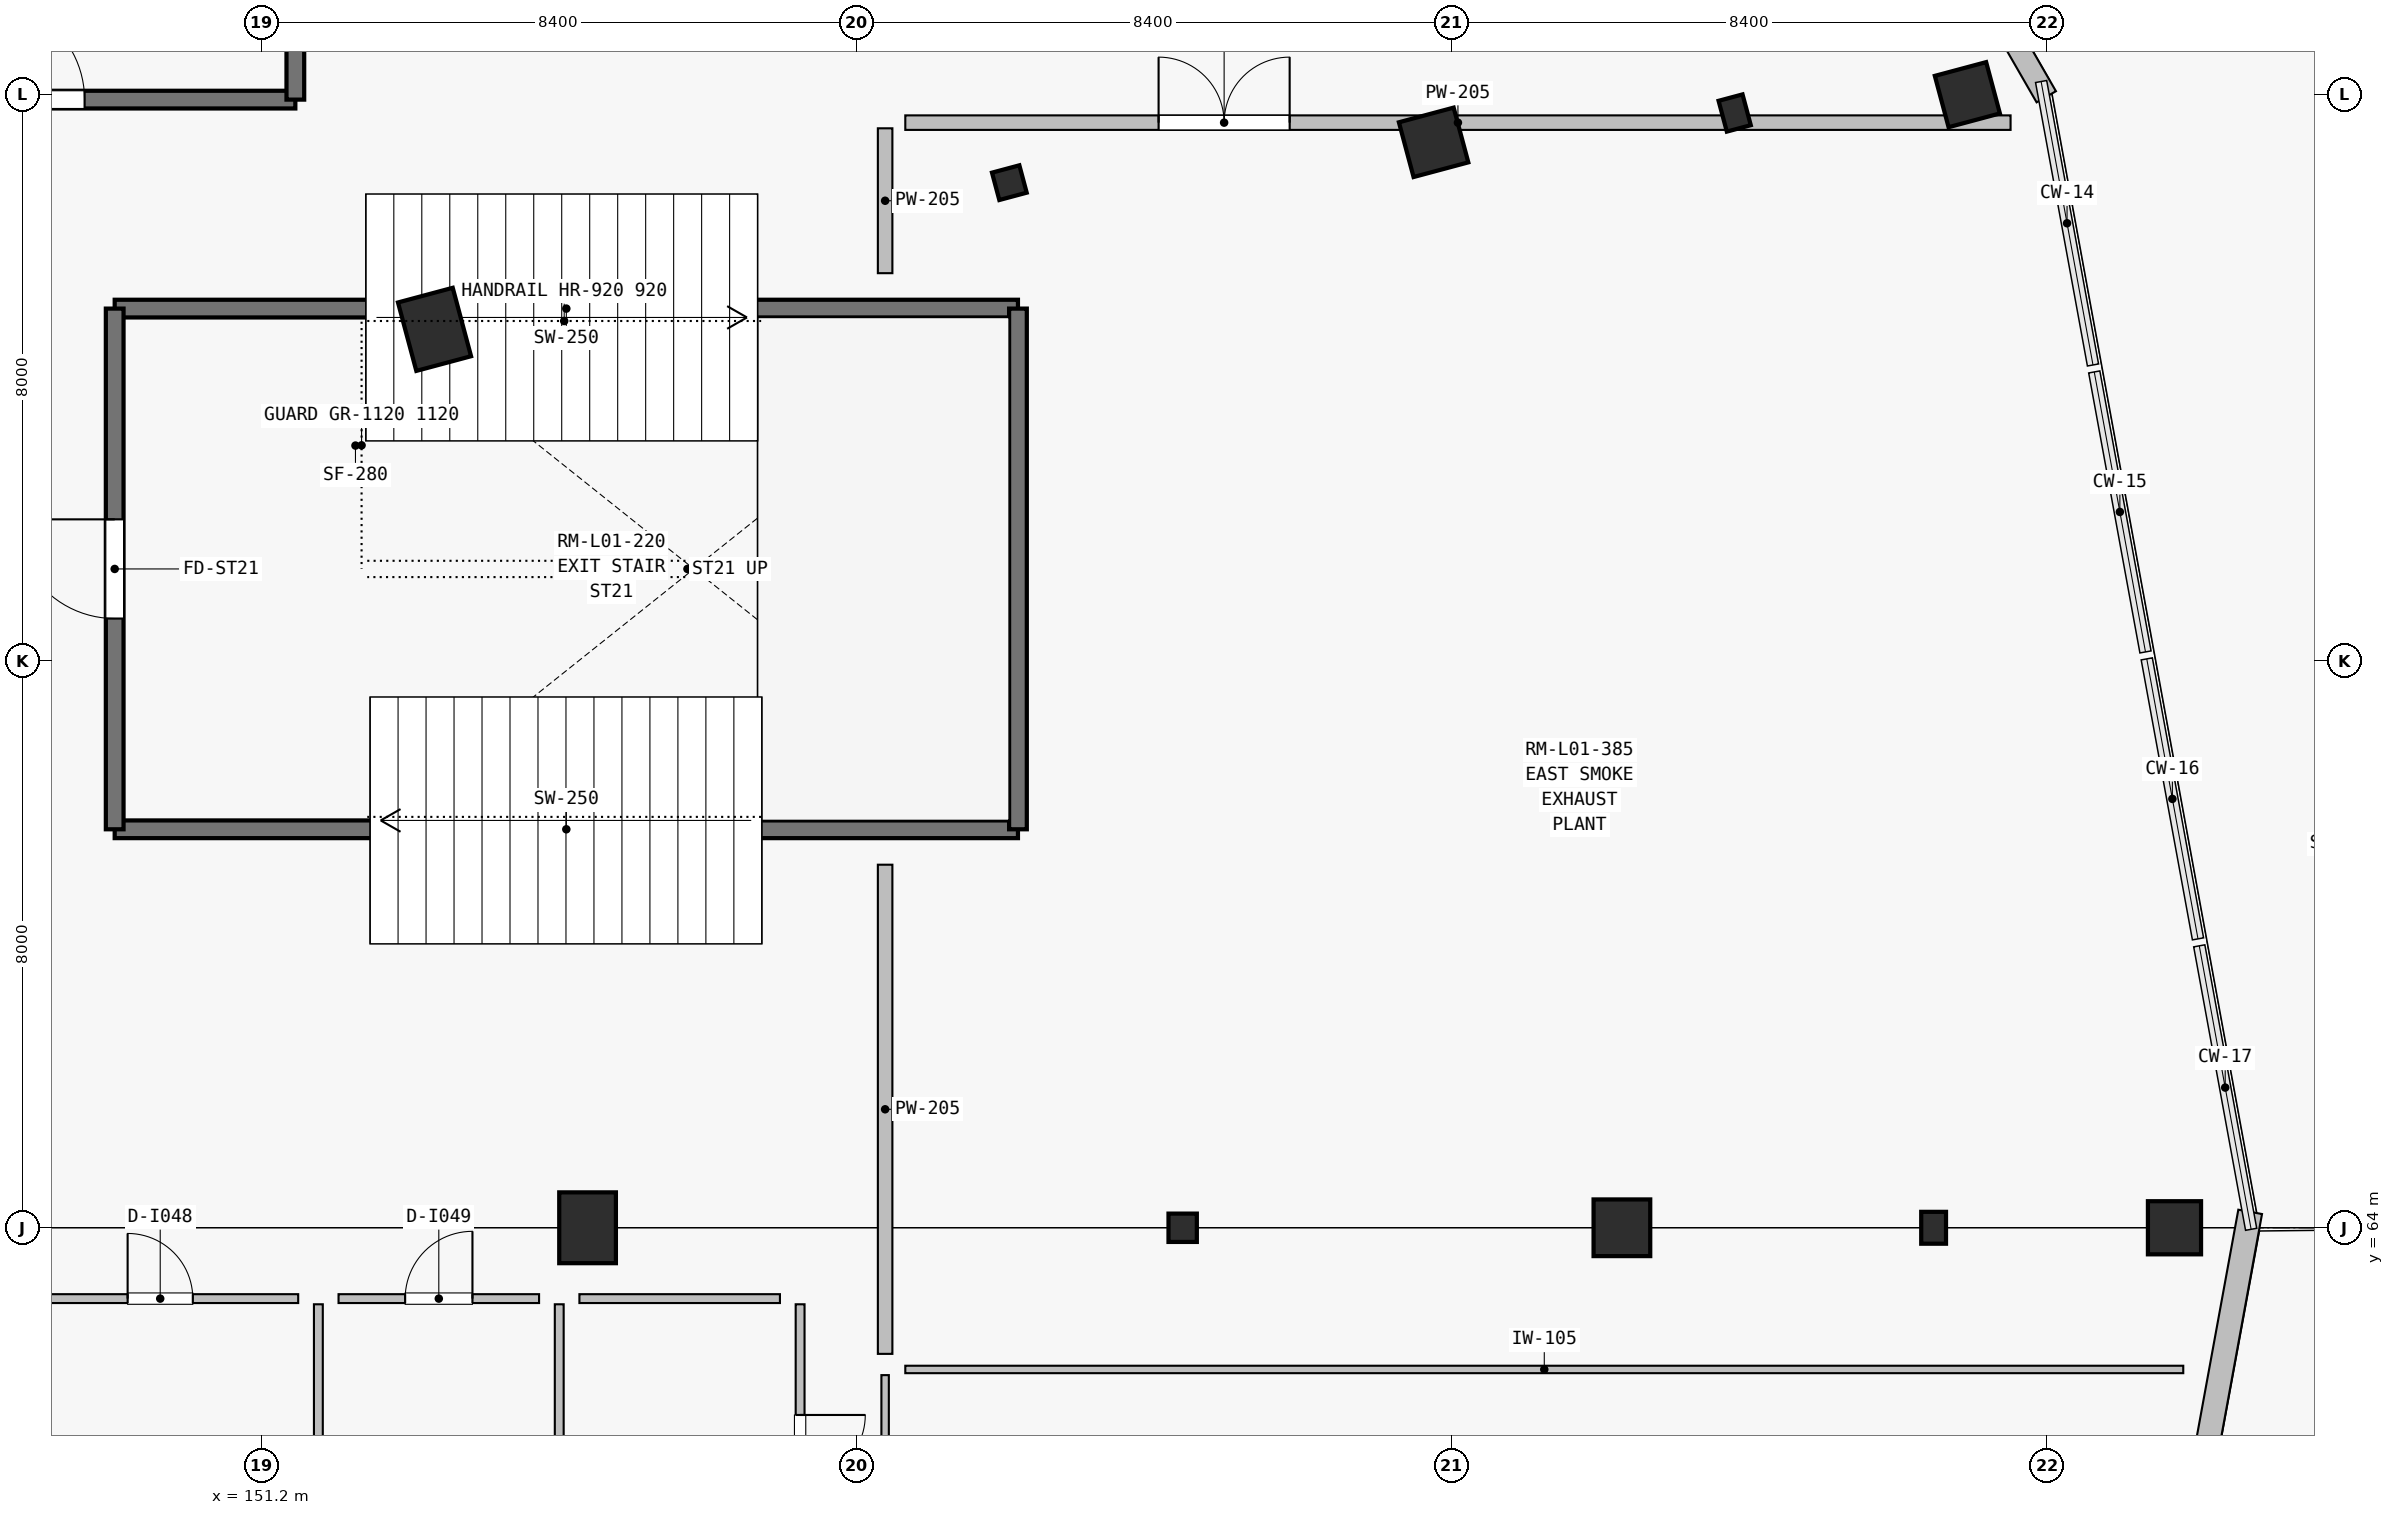
"""IFC4 building model, lengths in metres.
Left out: names, types, materials, properties, quantities, classifications, styles, units other than length and angle.
Written with IfcOpenShell. Run it as: python <this file> out.ifc"""

import sys

from ifc_helpers import new_model, si_unit, direction, frame, frame_2d, origin, origin_2d, place, context, subcontext, project, spatial, rectangle, i_section, extrude, element, fill, save


model = new_model("IFC4")
c1 = context("Model", 3, precision=1e-05, world=origin(), true_north=direction((0.0, 1.0)))
c2 = subcontext(c1, "Body", "Model", "MODEL_VIEW")
j1 = project(units=[si_unit("LENGTHUNIT", "METRE"), si_unit("PLANEANGLEUNIT", "RADIAN")], contexts=[c1])
p1 = place(None, origin())
s1 = spatial("IfcSite", under=j1, at=p1, CompositionType="ELEMENT")
p2 = place(p1, origin())
s2 = spatial("IfcBuilding", under=s1, at=p2, CompositionType="ELEMENT")
p3 = place(p2, frame((0.0, 0.0, 5.4)))
s3 = spatial("IfcBuildingStorey", under=s2, at=p3, CompositionType="ELEMENT", Elevation=5.4)
for number, where, z_axis, x_axis in (
    (1, (155.8, 64.0, 0.0), (0.0, 0.0, 1.0), (1.0, 0.0, 0.0)),
    (2, (153.64, 76.682, 0.0), (0.0, 0.0, 1.0), (0.966, 0.259, 0.0)),
):
    element("IfcColumn", number, at=place(p3, frame(where, z_axis=z_axis, x_axis=x_axis)), inside=s3, PredefinedType="COLUMN", context=c2, shape_type="SweptSolid", body=[
        extrude(rectangle(XDim=0.8, YDim=1.0, at=origin_2d()), origin(), (0.0, 0.0, 1.0), 4.5),
    ])
for number, where, z_axis, x_axis in (
    (3, (164.2, 64.0, 0.0), (0.0, 0.0, 1.0), (1.0, 0.0, 0.0)),
    (4, (161.753, 78.753, 0.0), (0.0, 0.0, 1.0), (0.966, 0.259, 0.0)),
):
    element("IfcColumn", number, at=place(p3, frame(where, z_axis=z_axis, x_axis=x_axis)), inside=s3, PredefinedType="COLUMN", context=c2, shape_type="SweptSolid", body=[
        extrude(i_section(OverallWidth=0.4, OverallDepth=0.4, WebThickness=0.018, FlangeThickness=0.032, at=origin_2d()), origin(), (0.0, 0.0, 1.0), 4.5),
    ])
for number, where, z_axis, x_axis in (
    (5, (170.4, 64.0, 0.0), (0.0, 0.0, 1.0), (1.0, 0.0, 0.0)),
    (6, (167.742, 79.322, 0.0), (0.0, 0.0, 1.0), (0.966, 0.259, 0.0)),
):
    element("IfcColumn", number, at=place(p3, frame(where, z_axis=z_axis, x_axis=x_axis)), inside=s3, PredefinedType="COLUMN", context=c2, shape_type="SweptSolid", body=[
        extrude(rectangle(XDim=0.8, YDim=0.8, at=origin_2d()), origin(), (0.0, 0.0, 1.0), 4.5),
    ])
for number, where, z_axis, x_axis in (
    (7, (178.2, 64.0, 0.0), (0.0, 0.0, 1.0), (1.0, 0.0, 0.0)),
    (8, (175.276, 79.995, 0.0), (0.0, 0.0, 1.0), (0.966, 0.259, 0.0)),
):
    element("IfcColumn", number, at=place(p3, frame(where, z_axis=z_axis, x_axis=x_axis)), inside=s3, PredefinedType="COLUMN", context=c2, shape_type="SweptSolid", body=[
        extrude(rectangle(XDim=0.75, YDim=0.75, at=origin_2d()), origin(), (0.0, 0.0, 1.0), 4.25),
    ])
for number, where, z_axis, x_axis in (
    (9, (174.8, 64.0, 0.0), (0.0, 0.0, 1.0), (1.0, 0.0, 0.0)),
    (10, (171.992, 79.736, 0.0), (0.0, 0.0, 1.0), (0.966, 0.259, 0.0)),
):
    element("IfcColumn", number, at=place(p3, frame(where, z_axis=z_axis, x_axis=x_axis)), inside=s3, PredefinedType="PILASTER", context=c2, shape_type="SweptSolid", body=[
        extrude(rectangle(XDim=0.35, YDim=0.45, at=origin_2d()), origin(), (0.0, 0.0, 1.0), 4.5),
    ])
p4 = place(p3, frame((167.517, 95.38, 0.0), z_axis=(0.0, 0.0, 1.0), x_axis=(0.4988947801, -0.866662563163, 0.0)))
e11 = element("IfcWall", 11, at=p4, inside=s3, PredefinedType="SOLIDWALL", context=c2, shape_type="SweptSolid", body=[
    extrude(rectangle(XDim=17.786, YDim=0.315, at=frame_2d((8.893, 0.0))), origin(), (0.0, 0.0, 1.0), 4.25),
])
p5 = place(p4, frame((1.9, 0.0, 0.9)))
e12 = element("IfcOpeningElement", 12, at=p5, cuts=e11, PredefinedType="OPENING", context=c2, shape_type="SweptSolid", body=[
    extrude(rectangle(XDim=2.7, YDim=1.55, at=frame_2d((1.35, 0.775))), frame((0.0, 0.167, 0.0), z_axis=(0.0, -1.0, 0.0), x_axis=(1.0, 0.0, 0.0)), (0.0, 0.0, 1.0), 0.335),
])
p6 = place(p4, frame((6.55, 0.0, 0.9)))
e13 = element("IfcOpeningElement", 13, at=p6, cuts=e11, PredefinedType="OPENING", context=c2, shape_type="SweptSolid", body=[
    extrude(rectangle(XDim=2.6, YDim=1.4, at=frame_2d((1.3, 0.7))), frame((0.0, 0.167, 0.0), z_axis=(0.0, -1.0, 0.0), x_axis=(1.0, 0.0, 0.0)), (0.0, 0.0, 1.0), 0.335),
])
p7 = place(p4, frame((11.3, 0.0, 0.9)))
e14 = element("IfcOpeningElement", 14, at=p7, cuts=e11, PredefinedType="OPENING", context=c2, shape_type="SweptSolid", body=[
    extrude(rectangle(XDim=2.3, YDim=1.3, at=frame_2d((1.15, 0.65))), frame((0.0, 0.167, 0.0), z_axis=(0.0, -1.0, 0.0), x_axis=(1.0, 0.0, 0.0)), (0.0, 0.0, 1.0), 0.335),
])
p8 = place(p3, frame((179.268, 64.225, 0.0), z_axis=(0.0, 0.0, 1.0), x_axis=(-0.179977817545, -0.983670669072, 0.0)))
e15 = element("IfcWall", 15, at=p8, inside=s3, PredefinedType="SOLIDWALL", context=c2, shape_type="SweptSolid", body=[
    extrude(rectangle(XDim=10.56, YDim=0.34, at=frame_2d((5.28, 0.0))), origin(), (0.0, 0.0, 1.0), 4.26),
])
for number, where, z_axis, x_axis in (
    (16, (149.125, 69.625, 0.0), (0.0, 0.0, 1.0), (1.0, 0.0, 0.0)),
    (17, (149.125, 76.975, 0.0), (0.0, 0.0, 1.0), (1.0, 0.0, 0.0)),
):
    element("IfcWall", number, at=place(p3, frame(where, z_axis=z_axis, x_axis=x_axis)), inside=s3, PredefinedType="SHEAR", context=c2, shape_type="SweptSolid", body=[
        extrude(rectangle(XDim=12.75, YDim=0.25, at=frame_2d((6.375, 0.0))), origin(), (0.0, 0.0, 1.0), 4.5),
    ])
p9 = place(p3, frame((149.125, 69.625, 0.0), z_axis=(0.0, 0.0, 1.0), x_axis=(0.0, 1.0, 0.0)))
e18 = element("IfcWall", 18, at=p9, inside=s3, PredefinedType="SHEAR", context=c2, shape_type="SweptSolid", body=[
    extrude(rectangle(XDim=7.35, YDim=0.25, at=frame_2d((3.675, 0.0))), origin(), (0.0, 0.0, 1.0), 4.5),
])
p10 = place(p9, frame((2.975, 0.0, 0.0)))
e19 = element("IfcOpeningElement", 19, at=p10, cuts=e18, PredefinedType="OPENING", context=c2, shape_type="SweptSolid", body=[
    extrude(rectangle(XDim=1.4, YDim=2.2, at=frame_2d((0.7, 1.1))), frame((0.0, 0.135, 0.0), z_axis=(0.0, -1.0, 0.0), x_axis=(1.0, 0.0, 0.0)), (0.0, 0.0, 1.0), 0.27),
])
p11 = place(p3, frame((161.875, 69.625, 0.0), z_axis=(0.0, 0.0, 1.0), x_axis=(0.0, 1.0, 0.0)))
e20 = element("IfcWall", 20, at=p11, inside=s3, PredefinedType="SHEAR", context=c2, shape_type="SweptSolid", body=[
    extrude(rectangle(XDim=7.35, YDim=0.25, at=frame_2d((3.675, 0.0))), origin(), (0.0, 0.0, 1.0), 4.5),
])
p12 = place(p3, frame((144.325, 79.925, 0.0), z_axis=(0.0, 0.0, 1.0), x_axis=(1.0, 0.0, 0.0)))
e21 = element("IfcWall", 21, at=p12, inside=s3, PredefinedType="SHEAR", context=c2, shape_type="SweptSolid", body=[
    extrude(rectangle(XDim=7.35, YDim=0.25, at=frame_2d((3.675, 0.0))), origin(), (0.0, 0.0, 1.0), 4.5),
])
p13 = place(p12, frame((2.975, 0.0, 0.0)))
e22 = element("IfcOpeningElement", 22, at=p13, cuts=e21, PredefinedType="OPENING", context=c2, shape_type="SweptSolid", body=[
    extrude(rectangle(XDim=1.4, YDim=2.2, at=frame_2d((0.7, 1.1))), frame((0.0, 0.135, 0.0), z_axis=(0.0, -1.0, 0.0), x_axis=(1.0, 0.0, 0.0)), (0.0, 0.0, 1.0), 0.27),
])
p14 = place(p3, frame((151.675, 79.925, 0.0), z_axis=(0.0, 0.0, 1.0), x_axis=(0.0, 1.0, 0.0)))
e23 = element("IfcWall", 23, at=p14, inside=s3, PredefinedType="SHEAR", context=c2, shape_type="SweptSolid", body=[
    extrude(rectangle(XDim=12.75, YDim=0.25, at=frame_2d((6.375, 0.0))), origin(), (0.0, 0.0, 1.0), 4.5),
])
p15 = place(p3, frame((152.0, 62.92, 0.0), z_axis=(0.0, 0.0, 1.0), x_axis=(0.0, -1.0, 0.0)))
e24 = element("IfcWall", 24, at=p15, inside=s3, PredefinedType="PARTITIONING", context=c2, shape_type="SweptSolid", body=[
    extrude(rectangle(XDim=4.045, YDim=0.125, at=frame_2d((2.022, 0.0))), origin(), (0.0, 0.0, 1.0), 4.2),
])
p16 = place(p3, frame((147.82, 63.0, 0.0), z_axis=(0.0, 0.0, 1.0), x_axis=(1.0, 0.0, 0.0)))
e25 = element("IfcWall", 25, at=p16, inside=s3, PredefinedType="PARTITIONING", context=c2, shape_type="SweptSolid", body=[
    extrude(rectangle(XDim=3.895, YDim=0.125, at=frame_2d((1.948, 0.0))), origin(), (0.0, 0.0, 1.0), 4.2),
])
p17 = place(p16, frame((1.488, 0.0, 0.0)))
e26 = element("IfcOpeningElement", 26, at=p17, cuts=e25, PredefinedType="OPENING", context=c2, shape_type="SweptSolid", body=[
    extrude(rectangle(XDim=0.92, YDim=2.1, at=frame_2d((0.46, 1.05))), frame((0.0, 0.073, 0.0), z_axis=(0.0, -1.0, 0.0), x_axis=(1.0, 0.0, 0.0)), (0.0, 0.0, 1.0), 0.145),
])
p18 = place(p3, frame((155.4, 62.92, 0.0), z_axis=(0.0, 0.0, 1.0), x_axis=(0.0, -1.0, 0.0)))
e27 = element("IfcWall", 27, at=p18, inside=s3, PredefinedType="PARTITIONING", context=c2, shape_type="SweptSolid", body=[
    extrude(rectangle(XDim=4.045, YDim=0.125, at=frame_2d((2.022, 0.0))), origin(), (0.0, 0.0, 1.0), 4.2),
])
p19 = place(p3, frame((152.285, 63.0, 0.0), z_axis=(0.0, 0.0, 1.0), x_axis=(1.0, 0.0, 0.0)))
e28 = element("IfcWall", 28, at=p19, inside=s3, PredefinedType="PARTITIONING", context=c2, shape_type="SweptSolid", body=[
    extrude(rectangle(XDim=2.83, YDim=0.125, at=frame_2d((1.415, 0.0))), origin(), (0.0, 0.0, 1.0), 4.2),
])
p20 = place(p19, frame((0.94, 0.0, 0.0)))
e29 = element("IfcOpeningElement", 29, at=p20, cuts=e28, PredefinedType="OPENING", context=c2, shape_type="SweptSolid", body=[
    extrude(rectangle(XDim=0.95, YDim=2.1, at=frame_2d((0.475, 1.05))), frame((0.0, 0.073, 0.0), z_axis=(0.0, -1.0, 0.0), x_axis=(1.0, 0.0, 0.0)), (0.0, 0.0, 1.0), 0.145),
])
p21 = place(p3, frame((158.8, 62.92, 0.0), z_axis=(0.0, 0.0, 1.0), x_axis=(0.0, -1.0, 0.0)))
e30 = element("IfcWall", 30, at=p21, inside=s3, PredefinedType="PARTITIONING", context=c2, shape_type="SweptSolid", body=[
    extrude(rectangle(XDim=4.045, YDim=0.125, at=frame_2d((2.022, 0.0))), origin(), (0.0, 0.0, 1.0), 4.2),
])
p22 = place(p21, frame((1.562, 0.0, 0.0)))
e31 = element("IfcOpeningElement", 31, at=p22, cuts=e30, PredefinedType="OPENING", context=c2, shape_type="SweptSolid", body=[
    extrude(rectangle(XDim=0.92, YDim=2.1, at=frame_2d((0.46, 1.05))), frame((0.0, 0.073, 0.0), z_axis=(0.0, -1.0, 0.0), x_axis=(1.0, 0.0, 0.0)), (0.0, 0.0, 1.0), 0.145),
])
p23 = place(p3, frame((155.685, 63.0, 0.0), z_axis=(0.0, 0.0, 1.0), x_axis=(1.0, 0.0, 0.0)))
e32 = element("IfcWall", 32, at=p23, inside=s3, PredefinedType="PARTITIONING", context=c2, shape_type="SweptSolid", body=[
    extrude(rectangle(XDim=2.83, YDim=0.125, at=frame_2d((1.415, 0.0))), origin(), (0.0, 0.0, 1.0), 4.2),
])
p24 = place(p3, frame((160.0, 58.875, 0.0), z_axis=(0.0, 0.0, 1.0), x_axis=(0.0, 1.0, 0.0)))
e33 = element("IfcWall", 33, at=p24, inside=s3, PredefinedType="PARTITIONING", context=c2, shape_type="SweptSolid", body=[
    extrude(rectangle(XDim=3.045, YDim=0.105, at=frame_2d((1.522, 0.0))), origin(), (0.0, 0.0, 1.0), 4.2),
])
p25 = place(p24, frame((0.982, 0.0, 0.0)))
e34 = element("IfcOpeningElement", 34, at=p25, cuts=e33, PredefinedType="OPENING", context=c2, shape_type="SweptSolid", body=[
    extrude(rectangle(XDim=1.08, YDim=2.15, at=frame_2d((0.54, 1.075))), frame((0.0, 0.062, 0.0), z_axis=(0.0, -1.0, 0.0), x_axis=(1.0, 0.0, 0.0)), (0.0, 0.0, 1.0), 0.125),
])
p26 = place(p3, frame((160.285, 62.0, 0.0), z_axis=(0.0, 0.0, 1.0), x_axis=(1.0, 0.0, 0.0)))
e35 = element("IfcWall", 35, at=p26, inside=s3, PredefinedType="PARTITIONING", context=c2, shape_type="SweptSolid", body=[
    extrude(rectangle(XDim=18.039, YDim=0.105, at=frame_2d((9.02, 0.0))), origin(), (0.0, 0.0, 1.0), 3.475),
])
p27 = place(p3, frame((160.0, 77.475, 0.0), z_axis=(0.0, 0.0, 1.0), x_axis=(0.0, 1.0, 0.0)))
e36 = element("IfcWall", 36, at=p27, inside=s3, PredefinedType="SOLIDWALL", context=c2, shape_type="SweptSolid", body=[
    extrude(rectangle(XDim=2.045, YDim=0.205, at=frame_2d((1.022, 0.0))), origin(), (0.0, 0.0, 1.0), 4.22),
])
p28 = place(p3, frame((160.285, 79.6, 0.0), z_axis=(0.0, 0.0, 1.0), x_axis=(1.0, 0.0, 0.0)))
e37 = element("IfcWall", 37, at=p28, inside=s3, PredefinedType="SOLIDWALL", context=c2, shape_type="SweptSolid", body=[
    extrude(rectangle(XDim=15.601, YDim=0.205, at=frame_2d((7.801, 0.0))), origin(), (0.0, 0.0, 1.0), 3.495),
])
p29 = place(p28, frame((3.575, 0.0, 0.0)))
e38 = element("IfcOpeningElement", 38, at=p29, cuts=e37, PredefinedType="OPENING", context=c2, shape_type="SweptSolid", body=[
    extrude(rectangle(XDim=1.85, YDim=2.4, at=frame_2d((0.925, 1.2))), frame((0.0, 0.113, 0.0), z_axis=(0.0, -1.0, 0.0), x_axis=(1.0, 0.0, 0.0)), (0.0, 0.0, 1.0), 0.225),
])
p30 = place(p3, frame((160.0, 62.22, 0.0), z_axis=(0.0, 0.0, 1.0), x_axis=(0.0, 1.0, 0.0)))
e39 = element("IfcWall", 39, at=p30, inside=s3, PredefinedType="SOLIDWALL", context=c2, shape_type="SweptSolid", body=[
    extrude(rectangle(XDim=6.905, YDim=0.205, at=frame_2d((3.453, 0.0))), origin(), (0.0, 0.0, 1.0), 3.642),
])
p31 = place(p10, origin())
e40 = element("IfcDoor", 40, at=p31, inside=s3, OperationType="SINGLE_SWING_RIGHT", PredefinedType="DOOR", context=c2, shape_type="SweptSolid", body=[
    extrude(rectangle(XDim=1.4, YDim=2.2, at=frame_2d((0.7, 1.1))), frame((0.0, 0.025, 0.0), z_axis=(0.0, -1.0, 0.0), x_axis=(1.0, 0.0, 0.0)), (0.0, 0.0, 1.0), 0.05),
])
fill(e19, e40)
p32 = place(p13, origin())
e41 = element("IfcDoor", 41, at=p32, inside=s3, OperationType="SINGLE_SWING_LEFT", PredefinedType="DOOR", context=c2, shape_type="SweptSolid", body=[
    extrude(rectangle(XDim=1.4, YDim=2.2, at=frame_2d((0.7, 1.1))), frame((0.0, 0.025, 0.0), z_axis=(0.0, -1.0, 0.0), x_axis=(1.0, 0.0, 0.0)), (0.0, 0.0, 1.0), 0.05),
])
fill(e22, e41)
p33 = place(p17, origin())
e42 = element("IfcDoor", 42, at=p33, inside=s3, OperationType="SINGLE_SWING_LEFT", PredefinedType="DOOR", context=c2, shape_type="SweptSolid", body=[
    extrude(rectangle(XDim=0.92, YDim=2.1, at=frame_2d((0.46, 1.05))), frame((0.0, 0.025, 0.0), z_axis=(0.0, -1.0, 0.0), x_axis=(1.0, 0.0, 0.0)), (0.0, 0.0, 1.0), 0.05),
])
fill(e26, e42)
p34 = place(p20, origin())
e43 = element("IfcDoor", 43, at=p34, inside=s3, OperationType="SINGLE_SWING_RIGHT", PredefinedType="DOOR", context=c2, shape_type="SweptSolid", body=[
    extrude(rectangle(XDim=0.95, YDim=2.1, at=frame_2d((0.475, 1.05))), frame((0.0, 0.025, 0.0), z_axis=(0.0, -1.0, 0.0), x_axis=(1.0, 0.0, 0.0)), (0.0, 0.0, 1.0), 0.05),
])
fill(e29, e43)
p35 = place(p22, origin())
e44 = element("IfcDoor", 44, at=p35, inside=s3, OperationType="SINGLE_SWING_LEFT", PredefinedType="DOOR", context=c2, shape_type="SweptSolid", body=[
    extrude(rectangle(XDim=0.92, YDim=2.1, at=frame_2d((0.46, 1.05))), frame((0.0, 0.025, 0.0), z_axis=(0.0, -1.0, 0.0), x_axis=(1.0, 0.0, 0.0)), (0.0, 0.0, 1.0), 0.05),
])
fill(e31, e44)
p36 = place(p29, origin())
e45 = element("IfcDoor", 45, at=p36, inside=s3, OperationType="DOUBLE_DOOR_SINGLE_SWING", PredefinedType="DOOR", context=c2, shape_type="SweptSolid", body=[
    extrude(rectangle(XDim=1.85, YDim=2.4, at=frame_2d((0.925, 1.2))), frame((0.0, 0.025, 0.0), z_axis=(0.0, -1.0, 0.0), x_axis=(1.0, 0.0, 0.0)), (0.0, 0.0, 1.0), 0.05),
])
fill(e38, e45)
save(model, sys.argv[1])
